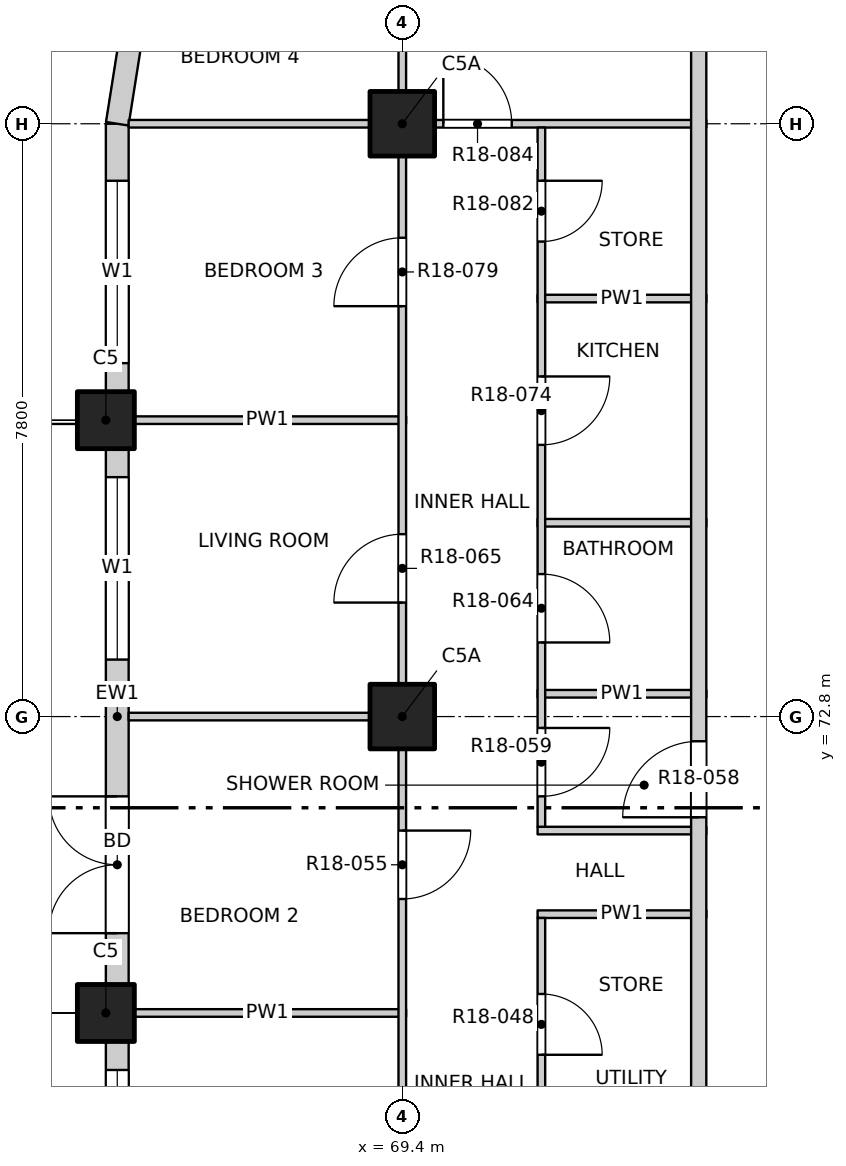
"""IFC4 building model, lengths in metres.
Left out: names, types, materials, properties, quantities, classifications, styles, units other than length and angle.
Written with IfcOpenShell. Run it as: python <this file> out.ifc"""

import sys

from ifc_helpers import new_model, si_unit, direction, frame, frame_2d, origin, origin_2d, place, context, subcontext, project, spatial, rectangle, extrude, element, fill, save


model = new_model("IFC4")
c1 = context("Model", 3, precision=1e-05, world=origin(), true_north=direction((0.0, 1.0)))
c2 = subcontext(c1, "Body", "Model", "MODEL_VIEW")
j1 = project(units=[si_unit("LENGTHUNIT", "METRE"), si_unit("PLANEANGLEUNIT", "RADIAN")], contexts=[c1])
p1 = place(None, origin())
s1 = spatial("IfcSite", under=j1, at=p1, CompositionType="ELEMENT")
p2 = place(p1, origin())
s2 = spatial("IfcBuilding", under=s1, at=p2, CompositionType="ELEMENT")
p3 = place(p2, frame((0.0, 0.0, 186.0)))
s3 = spatial("IfcBuildingStorey", under=s2, at=p3, CompositionType="ELEMENT", Elevation=186.0)
for number, where, z_axis, x_axis in (
    (1, (65.5, 68.9, -0.25), (0.0, 0.0, 1.0), (1.0, 0.0, 0.0)),
    (2, (65.5, 76.7, -0.25), (0.0, 0.0, 1.0), (1.0, 0.0, 0.0)),
):
    element("IfcColumn", number, at=place(p3, frame(where, z_axis=z_axis, x_axis=x_axis)), inside=s3, PredefinedType="COLUMN", context=c2, shape_type="SweptSolid", body=[
        extrude(rectangle(XDim=0.75, YDim=0.75, at=origin_2d()), origin(), (0.0, 0.0, 1.0), 3.4),
    ])
for number, where, z_axis, x_axis in (
    (3, (69.4, 72.8, -0.25), (0.0, 0.0, 1.0), (1.0, 0.0, 0.0)),
    (4, (69.4, 80.6, -0.25), (0.0, 0.0, 1.0), (1.0, 0.0, 0.0)),
):
    element("IfcColumn", number, at=place(p3, frame(where, z_axis=z_axis, x_axis=x_axis)), inside=s3, PredefinedType="COLUMN", context=c2, shape_type="SweptSolid", body=[
        extrude(rectangle(XDim=0.85, YDim=0.85, at=origin_2d()), origin(), (0.0, 0.0, 1.0), 3.4),
    ])
p4 = place(p3, frame((65.65, 61.475, 0.0), z_axis=(0.0, 0.0, 1.0), x_axis=(0.0, 1.0, 0.0)))
e5 = element("IfcWall", 5, at=p4, inside=s3, PredefinedType="SOLIDWALL", context=c2, shape_type="SweptSolid", body=[
    extrude(rectangle(XDim=7.05, YDim=0.3, at=frame_2d((3.525, 0.0))), origin(), (0.0, 0.0, 1.0), 2.7),
])
p5 = place(p4, frame((0.675, 0.0, 0.0)))
e6 = element("IfcOpeningElement", 6, at=p5, cuts=e5, PredefinedType="OPENING", context=c2, shape_type="SweptSolid", body=[
    extrude(rectangle(XDim=1.8, YDim=2.4, at=frame_2d((0.9, 1.2))), frame((0.0, 0.16, 0.0), z_axis=(0.0, -1.0, 0.0), x_axis=(1.0, 0.0, 0.0)), (0.0, 0.0, 1.0), 0.32),
])
p6 = place(p4, frame((4.275, 0.0, 0.9)))
e7 = element("IfcOpeningElement", 7, at=p6, cuts=e5, PredefinedType="OPENING", context=c2, shape_type="SweptSolid", body=[
    extrude(rectangle(XDim=2.4, YDim=1.8, at=frame_2d((1.2, 0.9))), frame((0.0, 0.16, 0.0), z_axis=(0.0, -1.0, 0.0), x_axis=(1.0, 0.0, 0.0)), (0.0, 0.0, 1.0), 0.32),
])
p7 = place(p3, frame((65.65, 69.275, 0.0), z_axis=(0.0, 0.0, 1.0), x_axis=(0.0, 1.0, 0.0)))
e8 = element("IfcWall", 8, at=p7, inside=s3, PredefinedType="SOLIDWALL", context=c2, shape_type="SweptSolid", body=[
    extrude(rectangle(XDim=7.05, YDim=0.3, at=frame_2d((3.525, 0.0))), origin(), (0.0, 0.0, 1.0), 2.7),
])
p8 = place(p7, frame((0.675, 0.0, 0.0)))
e9 = element("IfcOpeningElement", 9, at=p8, cuts=e8, PredefinedType="OPENING", context=c2, shape_type="SweptSolid", body=[
    extrude(rectangle(XDim=1.8, YDim=2.4, at=frame_2d((0.9, 1.2))), frame((0.0, 0.16, 0.0), z_axis=(0.0, -1.0, 0.0), x_axis=(1.0, 0.0, 0.0)), (0.0, 0.0, 1.0), 0.32),
])
p9 = place(p7, frame((4.275, 0.0, 0.9)))
e10 = element("IfcOpeningElement", 10, at=p9, cuts=e8, PredefinedType="OPENING", context=c2, shape_type="SweptSolid", body=[
    extrude(rectangle(XDim=2.4, YDim=1.8, at=frame_2d((1.2, 0.9))), frame((0.0, 0.16, 0.0), z_axis=(0.0, -1.0, 0.0), x_axis=(1.0, 0.0, 0.0)), (0.0, 0.0, 1.0), 0.32),
])
p10 = place(p3, frame((65.65, 77.075, 0.0), z_axis=(0.0, 0.0, 1.0), x_axis=(0.0, 1.0, 0.0)))
e11 = element("IfcWall", 11, at=p10, inside=s3, PredefinedType="SOLIDWALL", context=c2, shape_type="SweptSolid", body=[
    extrude(rectangle(XDim=3.525, YDim=0.3, at=frame_2d((1.763, 0.0))), origin(), (0.0, 0.0, 1.0), 2.7),
])
p11 = place(p10, frame((0.375, 0.0, 0.9)))
e12 = element("IfcOpeningElement", 12, at=p11, cuts=e11, PredefinedType="OPENING", context=c2, shape_type="SweptSolid", body=[
    extrude(rectangle(XDim=2.4, YDim=1.8, at=frame_2d((1.2, 0.9))), frame((0.0, 0.16, 0.0), z_axis=(0.0, -1.0, 0.0), x_axis=(1.0, 0.0, 0.0)), (0.0, 0.0, 1.0), 0.32),
])
p12 = place(p3, frame((65.833, 81.759, 0.0), z_axis=(0.0, 0.0, 1.0), x_axis=(-0.156496880861, -0.987678452879, 0.0)))
e13 = element("IfcWall", 13, at=p12, inside=s3, PredefinedType="SOLIDWALL", context=c2, shape_type="SweptSolid", body=[
    extrude(rectangle(XDim=1.173, YDim=0.3, at=frame_2d((0.586, 0.0))), origin(), (0.0, 0.0, 1.0), 2.7),
])
p13 = place(p3, frame((65.8, 68.9, 0.0), z_axis=(0.0, 0.0, 1.0), x_axis=(1.0, 0.0, 0.0)))
e14 = element("IfcWall", 14, at=p13, inside=s3, PredefinedType="PARTITIONING", context=c2, shape_type="SweptSolid", body=[
    extrude(rectangle(XDim=3.65, YDim=0.1, at=frame_2d((1.825, 0.0))), origin(), (0.0, 0.0, 1.0), 2.55),
])
for number, where, z_axis, x_axis in (
    (15, (71.18, 70.2, 0.0), (0.0, 0.0, 1.0), (1.0, 0.0, 0.0)),
    (16, (71.18, 71.3, 0.0), (0.0, 0.0, 1.0), (1.0, 0.0, 0.0)),
):
    element("IfcWall", number, at=place(p3, frame(where, z_axis=z_axis, x_axis=x_axis)), inside=s3, PredefinedType="PARTITIONING", context=c2, shape_type="SweptSolid", body=[
        extrude(rectangle(XDim=2.22, YDim=0.1, at=frame_2d((1.11, 0.0))), origin(), (0.0, 0.0, 1.0), 3.15),
    ])
p14 = place(p3, frame((65.8, 72.8, 0.0), z_axis=(0.0, 0.0, 1.0), x_axis=(1.0, 0.0, 0.0)))
e17 = element("IfcWall", 17, at=p14, inside=s3, PredefinedType="PARTITIONING", context=c2, shape_type="SweptSolid", body=[
    extrude(rectangle(XDim=3.65, YDim=0.1, at=frame_2d((1.825, 0.0))), origin(), (0.0, 0.0, 1.0), 3.15),
])
for number, where, z_axis, x_axis in (
    (18, (71.18, 73.1, 0.0), (0.0, 0.0, 1.0), (1.0, 0.0, 0.0)),
    (19, (71.18, 75.35, 0.0), (0.0, 0.0, 1.0), (1.0, 0.0, 0.0)),
):
    element("IfcWall", number, at=place(p3, frame(where, z_axis=z_axis, x_axis=x_axis)), inside=s3, PredefinedType="PARTITIONING", context=c2, shape_type="SweptSolid", body=[
        extrude(rectangle(XDim=2.22, YDim=0.1, at=frame_2d((1.11, 0.0))), origin(), (0.0, 0.0, 1.0), 3.15),
    ])
p15 = place(p3, frame((65.8, 76.7, 0.0), z_axis=(0.0, 0.0, 1.0), x_axis=(1.0, 0.0, 0.0)))
e20 = element("IfcWall", 20, at=p15, inside=s3, PredefinedType="PARTITIONING", context=c2, shape_type="SweptSolid", body=[
    extrude(rectangle(XDim=3.65, YDim=0.1, at=frame_2d((1.825, 0.0))), origin(), (0.0, 0.0, 1.0), 2.55),
])
p16 = place(p3, frame((71.18, 78.3, 0.0), z_axis=(0.0, 0.0, 1.0), x_axis=(1.0, 0.0, 0.0)))
e21 = element("IfcWall", 21, at=p16, inside=s3, PredefinedType="PARTITIONING", context=c2, shape_type="SweptSolid", body=[
    extrude(rectangle(XDim=2.22, YDim=0.1, at=frame_2d((1.11, 0.0))), origin(), (0.0, 0.0, 1.0), 3.15),
])
p17 = place(p3, frame((65.8, 80.6, 0.0), z_axis=(0.0, 0.0, 1.0), x_axis=(1.0, 0.0, 0.0)))
e22 = element("IfcWall", 22, at=p17, inside=s3, PredefinedType="PARTITIONING", context=c2, shape_type="SweptSolid", body=[
    extrude(rectangle(XDim=7.6, YDim=0.1, at=frame_2d((3.8, 0.0))), origin(), (0.0, 0.0, 1.0), 3.15),
])
p18 = place(p17, frame((4.14, 0.0, 0.0)))
e23 = element("IfcOpeningElement", 23, at=p18, cuts=e22, PredefinedType="OPENING", context=c2, shape_type="SweptSolid", body=[
    extrude(rectangle(XDim=0.9, YDim=2.1, at=frame_2d((0.45, 1.05))), frame((0.0, 0.06, 0.0), z_axis=(0.0, -1.0, 0.0), x_axis=(1.0, 0.0, 0.0)), (0.0, 0.0, 1.0), 0.12),
])
p19 = place(p3, frame((69.4, 45.8, 0.0), z_axis=(0.0, 0.0, 1.0), x_axis=(0.0, 1.0, 0.0)))
e24 = element("IfcWall", 24, at=p19, inside=s3, PredefinedType="PARTITIONING", context=c2, shape_type="SweptSolid", body=[
    extrude(rectangle(XDim=38.4, YDim=0.1, at=frame_2d((19.2, 0.0))), origin(), (0.0, 0.0, 1.0), 3.15),
])
p20 = place(p19, frame((1.05, 0.0, 0.0)))
e25 = element("IfcOpeningElement", 25, at=p20, cuts=e24, PredefinedType="OPENING", context=c2, shape_type="SweptSolid", body=[
    extrude(rectangle(XDim=1.2, YDim=2.1, at=frame_2d((0.6, 1.05))), frame((0.0, 0.06, 0.0), z_axis=(0.0, -1.0, 0.0), x_axis=(1.0, 0.0, 0.0)), (0.0, 0.0, 1.0), 0.12),
])
p21 = place(p19, frame((5.1, 0.0, 0.0)))
e26 = element("IfcOpeningElement", 26, at=p21, cuts=e24, PredefinedType="OPENING", context=c2, shape_type="SweptSolid", body=[
    extrude(rectangle(XDim=0.9, YDim=2.1, at=frame_2d((0.45, 1.05))), frame((0.0, 0.06, 0.0), z_axis=(0.0, -1.0, 0.0), x_axis=(1.0, 0.0, 0.0)), (0.0, 0.0, 1.0), 0.12),
])
p22 = place(p19, frame((9.0, 0.0, 0.0)))
e27 = element("IfcOpeningElement", 27, at=p22, cuts=e24, PredefinedType="OPENING", context=c2, shape_type="SweptSolid", body=[
    extrude(rectangle(XDim=0.9, YDim=2.1, at=frame_2d((0.45, 1.05))), frame((0.0, 0.06, 0.0), z_axis=(0.0, -1.0, 0.0), x_axis=(1.0, 0.0, 0.0)), (0.0, 0.0, 1.0), 0.12),
])
p23 = place(p19, frame((12.9, 0.0, 0.0)))
e28 = element("IfcOpeningElement", 28, at=p23, cuts=e24, PredefinedType="OPENING", context=c2, shape_type="SweptSolid", body=[
    extrude(rectangle(XDim=0.9, YDim=2.1, at=frame_2d((0.45, 1.05))), frame((0.0, 0.06, 0.0), z_axis=(0.0, -1.0, 0.0), x_axis=(1.0, 0.0, 0.0)), (0.0, 0.0, 1.0), 0.12),
])
p24 = place(p19, frame((16.8, 0.0, 0.0)))
e29 = element("IfcOpeningElement", 29, at=p24, cuts=e24, PredefinedType="OPENING", context=c2, shape_type="SweptSolid", body=[
    extrude(rectangle(XDim=0.9, YDim=2.1, at=frame_2d((0.45, 1.05))), frame((0.0, 0.06, 0.0), z_axis=(0.0, -1.0, 0.0), x_axis=(1.0, 0.0, 0.0)), (0.0, 0.0, 1.0), 0.12),
])
p25 = place(p19, frame((20.7, 0.0, 0.0)))
e30 = element("IfcOpeningElement", 30, at=p25, cuts=e24, PredefinedType="OPENING", context=c2, shape_type="SweptSolid", body=[
    extrude(rectangle(XDim=0.9, YDim=2.1, at=frame_2d((0.45, 1.05))), frame((0.0, 0.06, 0.0), z_axis=(0.0, -1.0, 0.0), x_axis=(1.0, 0.0, 0.0)), (0.0, 0.0, 1.0), 0.12),
])
p26 = place(p19, frame((24.6, 0.0, 0.0)))
e31 = element("IfcOpeningElement", 31, at=p26, cuts=e24, PredefinedType="OPENING", context=c2, shape_type="SweptSolid", body=[
    extrude(rectangle(XDim=0.9, YDim=2.1, at=frame_2d((0.45, 1.05))), frame((0.0, 0.06, 0.0), z_axis=(0.0, -1.0, 0.0), x_axis=(1.0, 0.0, 0.0)), (0.0, 0.0, 1.0), 0.12),
])
p27 = place(p19, frame((28.5, 0.0, 0.0)))
e32 = element("IfcOpeningElement", 32, at=p27, cuts=e24, PredefinedType="OPENING", context=c2, shape_type="SweptSolid", body=[
    extrude(rectangle(XDim=0.9, YDim=2.1, at=frame_2d((0.45, 1.05))), frame((0.0, 0.06, 0.0), z_axis=(0.0, -1.0, 0.0), x_axis=(1.0, 0.0, 0.0)), (0.0, 0.0, 1.0), 0.12),
])
p28 = place(p19, frame((32.4, 0.0, 0.0)))
e33 = element("IfcOpeningElement", 33, at=p28, cuts=e24, PredefinedType="OPENING", context=c2, shape_type="SweptSolid", body=[
    extrude(rectangle(XDim=0.9, YDim=2.1, at=frame_2d((0.45, 1.05))), frame((0.0, 0.06, 0.0), z_axis=(0.0, -1.0, 0.0), x_axis=(1.0, 0.0, 0.0)), (0.0, 0.0, 1.0), 0.12),
])
p29 = place(p19, frame((36.15, 0.0, 0.0)))
e34 = element("IfcOpeningElement", 34, at=p29, cuts=e24, PredefinedType="OPENING", context=c2, shape_type="SweptSolid", body=[
    extrude(rectangle(XDim=1.2, YDim=2.1, at=frame_2d((0.6, 1.05))), frame((0.0, 0.06, 0.0), z_axis=(0.0, -1.0, 0.0), x_axis=(1.0, 0.0, 0.0)), (0.0, 0.0, 1.0), 0.12),
])
p30 = place(p3, frame((71.23, 63.2, 0.0), z_axis=(0.0, 0.0, 1.0), x_axis=(0.0, 1.0, 0.0)))
e35 = element("IfcWall", 35, at=p30, inside=s3, PredefinedType="PARTITIONING", context=c2, shape_type="SweptSolid", body=[
    extrude(rectangle(XDim=6.95, YDim=0.1, at=frame_2d((3.475, 0.0))), origin(), (0.0, 0.0, 1.0), 3.15),
])
p31 = place(p30, frame((0.475, 0.0, 0.0)))
e36 = element("IfcOpeningElement", 36, at=p31, cuts=e35, PredefinedType="OPENING", context=c2, shape_type="SweptSolid", body=[
    extrude(rectangle(XDim=0.8, YDim=2.1, at=frame_2d((0.4, 1.05))), frame((0.0, 0.06, 0.0), z_axis=(0.0, -1.0, 0.0), x_axis=(1.0, 0.0, 0.0)), (0.0, 0.0, 1.0), 0.12),
])
p32 = place(p30, frame((2.55, 0.0, 0.0)))
e37 = element("IfcOpeningElement", 37, at=p32, cuts=e35, PredefinedType="OPENING", context=c2, shape_type="SweptSolid", body=[
    extrude(rectangle(XDim=0.8, YDim=2.1, at=frame_2d((0.4, 1.05))), frame((0.0, 0.06, 0.0), z_axis=(0.0, -1.0, 0.0), x_axis=(1.0, 0.0, 0.0)), (0.0, 0.0, 1.0), 0.12),
])
p33 = place(p30, frame((5.15, 0.0, 0.0)))
e38 = element("IfcOpeningElement", 38, at=p33, cuts=e35, PredefinedType="OPENING", context=c2, shape_type="SweptSolid", body=[
    extrude(rectangle(XDim=0.8, YDim=2.1, at=frame_2d((0.4, 1.05))), frame((0.0, 0.06, 0.0), z_axis=(0.0, -1.0, 0.0), x_axis=(1.0, 0.0, 0.0)), (0.0, 0.0, 1.0), 0.12),
])
p34 = place(p3, frame((71.23, 71.35, 0.0), z_axis=(0.0, 0.0, 1.0), x_axis=(0.0, 1.0, 0.0)))
e39 = element("IfcWall", 39, at=p34, inside=s3, PredefinedType="PARTITIONING", context=c2, shape_type="SweptSolid", body=[
    extrude(rectangle(XDim=9.2, YDim=0.1, at=frame_2d((4.6, 0.0))), origin(), (0.0, 0.0, 1.0), 3.15),
])
p35 = place(p34, frame((0.4, 0.0, 0.0)))
e40 = element("IfcOpeningElement", 40, at=p35, cuts=e39, PredefinedType="OPENING", context=c2, shape_type="SweptSolid", body=[
    extrude(rectangle(XDim=0.9, YDim=2.1, at=frame_2d((0.45, 1.05))), frame((0.0, 0.06, 0.0), z_axis=(0.0, -1.0, 0.0), x_axis=(1.0, 0.0, 0.0)), (0.0, 0.0, 1.0), 0.12),
])
p36 = place(p34, frame((2.425, 0.0, 0.0)))
e41 = element("IfcOpeningElement", 41, at=p36, cuts=e39, PredefinedType="OPENING", context=c2, shape_type="SweptSolid", body=[
    extrude(rectangle(XDim=0.9, YDim=2.1, at=frame_2d((0.45, 1.05))), frame((0.0, 0.06, 0.0), z_axis=(0.0, -1.0, 0.0), x_axis=(1.0, 0.0, 0.0)), (0.0, 0.0, 1.0), 0.12),
])
p37 = place(p34, frame((5.025, 0.0, 0.0)))
e42 = element("IfcOpeningElement", 42, at=p37, cuts=e39, PredefinedType="OPENING", context=c2, shape_type="SweptSolid", body=[
    extrude(rectangle(XDim=0.9, YDim=2.1, at=frame_2d((0.45, 1.05))), frame((0.0, 0.06, 0.0), z_axis=(0.0, -1.0, 0.0), x_axis=(1.0, 0.0, 0.0)), (0.0, 0.0, 1.0), 0.12),
])
p38 = place(p34, frame((7.7, 0.0, 0.0)))
e43 = element("IfcOpeningElement", 43, at=p38, cuts=e39, PredefinedType="OPENING", context=c2, shape_type="SweptSolid", body=[
    extrude(rectangle(XDim=0.8, YDim=2.1, at=frame_2d((0.4, 1.05))), frame((0.0, 0.06, 0.0), z_axis=(0.0, -1.0, 0.0), x_axis=(1.0, 0.0, 0.0)), (0.0, 0.0, 1.0), 0.12),
])
p39 = place(p3, frame((73.3, 49.5, 0.0), z_axis=(0.0, 0.0, 1.0), x_axis=(0.0, 1.0, 0.0)))
e44 = element("IfcWall", 44, at=p39, inside=s3, PredefinedType="PARTITIONING", context=c2, shape_type="SweptSolid", body=[
    extrude(rectangle(XDim=34.7, YDim=0.2, at=frame_2d((17.35, 0.0))), origin(), (0.0, 0.0, 1.0), 3.15),
])
p40 = place(p39, frame((13.825, 0.0, 0.0)))
e45 = element("IfcOpeningElement", 45, at=p40, cuts=e44, PredefinedType="OPENING", context=c2, shape_type="SweptSolid", body=[
    extrude(rectangle(XDim=1.0, YDim=2.1, at=frame_2d((0.5, 1.05))), frame((0.0, 0.11, 0.0), z_axis=(0.0, -1.0, 0.0), x_axis=(1.0, 0.0, 0.0)), (0.0, 0.0, 1.0), 0.22),
])
p41 = place(p39, frame((21.975, 0.0, 0.0)))
e46 = element("IfcOpeningElement", 46, at=p41, cuts=e44, PredefinedType="OPENING", context=c2, shape_type="SweptSolid", body=[
    extrude(rectangle(XDim=1.0, YDim=2.1, at=frame_2d((0.5, 1.05))), frame((0.0, 0.11, 0.0), z_axis=(0.0, -1.0, 0.0), x_axis=(1.0, 0.0, 0.0)), (0.0, 0.0, 1.0), 0.22),
])
p42 = place(p6, origin())
e47 = element("IfcWindow", 47, at=p42, inside=s3, PartitioningType="DOUBLE_PANEL_VERTICAL", PredefinedType="WINDOW", context=c2, shape_type="SweptSolid", body=[
    extrude(rectangle(XDim=2.4, YDim=1.8, at=frame_2d((1.2, 0.9))), frame((0.0, 0.03, 0.0), z_axis=(0.0, -1.0, 0.0), x_axis=(1.0, 0.0, 0.0)), (0.0, 0.0, 1.0), 0.06),
])
fill(e7, e47)
p43 = place(p8, origin())
e48 = element("IfcDoor", 48, at=p43, inside=s3, OperationType="DOUBLE_DOOR_SINGLE_SWING", PredefinedType="DOOR", context=c2, shape_type="SweptSolid", body=[
    extrude(rectangle(XDim=1.8, YDim=2.4, at=frame_2d((0.9, 1.2))), frame((0.0, 0.025, 0.0), z_axis=(0.0, -1.0, 0.0), x_axis=(1.0, 0.0, 0.0)), (0.0, 0.0, 1.0), 0.05),
])
fill(e9, e48)
p44 = place(p9, origin())
e49 = element("IfcWindow", 49, at=p44, inside=s3, PartitioningType="DOUBLE_PANEL_VERTICAL", PredefinedType="WINDOW", context=c2, shape_type="SweptSolid", body=[
    extrude(rectangle(XDim=2.4, YDim=1.8, at=frame_2d((1.2, 0.9))), frame((0.0, 0.03, 0.0), z_axis=(0.0, -1.0, 0.0), x_axis=(1.0, 0.0, 0.0)), (0.0, 0.0, 1.0), 0.06),
])
fill(e10, e49)
p45 = place(p11, origin())
e50 = element("IfcWindow", 50, at=p45, inside=s3, PartitioningType="DOUBLE_PANEL_VERTICAL", PredefinedType="WINDOW", context=c2, shape_type="SweptSolid", body=[
    extrude(rectangle(XDim=2.4, YDim=1.8, at=frame_2d((1.2, 0.9))), frame((0.0, 0.03, 0.0), z_axis=(0.0, -1.0, 0.0), x_axis=(1.0, 0.0, 0.0)), (0.0, 0.0, 1.0), 0.06),
])
fill(e12, e50)
p46 = place(p33, origin())
e51 = element("IfcDoor", 51, at=p46, inside=s3, OperationType="SINGLE_SWING_RIGHT", PredefinedType="DOOR", context=c2, shape_type="SweptSolid", body=[
    extrude(rectangle(XDim=0.8, YDim=2.1, at=frame_2d((0.4, 1.05))), frame((0.0, 0.025, 0.0), z_axis=(0.0, -1.0, 0.0), x_axis=(1.0, 0.0, 0.0)), (0.0, 0.0, 1.0), 0.05),
])
fill(e38, e51)
p47 = place(p26, origin())
e52 = element("IfcDoor", 52, at=p47, inside=s3, OperationType="SINGLE_SWING_LEFT", PredefinedType="DOOR", context=c2, shape_type="SweptSolid", body=[
    extrude(rectangle(XDim=0.9, YDim=2.1, at=frame_2d((0.45, 1.05))), frame((0.0, 0.025, 0.0), z_axis=(0.0, -1.0, 0.0), x_axis=(1.0, 0.0, 0.0)), (0.0, 0.0, 1.0), 0.05),
])
fill(e31, e52)
p48 = place(p41, origin())
e53 = element("IfcDoor", 53, at=p48, inside=s3, OperationType="SINGLE_SWING_RIGHT", PredefinedType="DOOR", context=c2, shape_type="SweptSolid", body=[
    extrude(rectangle(XDim=1.0, YDim=2.1, at=frame_2d((0.5, 1.05))), frame((0.0, 0.025, 0.0), z_axis=(0.0, -1.0, 0.0), x_axis=(1.0, 0.0, 0.0)), (0.0, 0.0, 1.0), 0.05),
])
fill(e46, e53)
p49 = place(p35, origin())
e54 = element("IfcDoor", 54, at=p49, inside=s3, OperationType="SINGLE_SWING_LEFT", PredefinedType="DOOR", context=c2, shape_type="SweptSolid", body=[
    extrude(rectangle(XDim=0.9, YDim=2.1, at=frame_2d((0.45, 1.05))), frame((0.0, 0.025, 0.0), z_axis=(0.0, -1.0, 0.0), x_axis=(1.0, 0.0, 0.0)), (0.0, 0.0, 1.0), 0.05),
])
fill(e40, e54)
p50 = place(p36, origin())
e55 = element("IfcDoor", 55, at=p50, inside=s3, OperationType="SINGLE_SWING_RIGHT", PredefinedType="DOOR", context=c2, shape_type="SweptSolid", body=[
    extrude(rectangle(XDim=0.9, YDim=2.1, at=frame_2d((0.45, 1.05))), frame((0.0, 0.025, 0.0), z_axis=(0.0, -1.0, 0.0), x_axis=(1.0, 0.0, 0.0)), (0.0, 0.0, 1.0), 0.05),
])
fill(e41, e55)
p51 = place(p27, origin())
e56 = element("IfcDoor", 56, at=p51, inside=s3, OperationType="SINGLE_SWING_LEFT", PredefinedType="DOOR", context=c2, shape_type="SweptSolid", body=[
    extrude(rectangle(XDim=0.9, YDim=2.1, at=frame_2d((0.45, 1.05))), frame((0.0, 0.025, 0.0), z_axis=(0.0, -1.0, 0.0), x_axis=(1.0, 0.0, 0.0)), (0.0, 0.0, 1.0), 0.05),
])
fill(e32, e56)
p52 = place(p37, origin())
e57 = element("IfcDoor", 57, at=p52, inside=s3, OperationType="SINGLE_SWING_LEFT", PredefinedType="DOOR", context=c2, shape_type="SweptSolid", body=[
    extrude(rectangle(XDim=0.9, YDim=2.1, at=frame_2d((0.45, 1.05))), frame((0.0, 0.025, 0.0), z_axis=(0.0, -1.0, 0.0), x_axis=(1.0, 0.0, 0.0)), (0.0, 0.0, 1.0), 0.05),
])
fill(e42, e57)
p53 = place(p28, origin())
e58 = element("IfcDoor", 58, at=p53, inside=s3, OperationType="SINGLE_SWING_LEFT", PredefinedType="DOOR", context=c2, shape_type="SweptSolid", body=[
    extrude(rectangle(XDim=0.9, YDim=2.1, at=frame_2d((0.45, 1.05))), frame((0.0, 0.025, 0.0), z_axis=(0.0, -1.0, 0.0), x_axis=(1.0, 0.0, 0.0)), (0.0, 0.0, 1.0), 0.05),
])
fill(e33, e58)
p54 = place(p38, origin())
e59 = element("IfcDoor", 59, at=p54, inside=s3, OperationType="SINGLE_SWING_LEFT", PredefinedType="DOOR", context=c2, shape_type="SweptSolid", body=[
    extrude(rectangle(XDim=0.8, YDim=2.1, at=frame_2d((0.4, 1.05))), frame((0.0, 0.025, 0.0), z_axis=(0.0, -1.0, 0.0), x_axis=(1.0, 0.0, 0.0)), (0.0, 0.0, 1.0), 0.05),
])
fill(e43, e59)
p55 = place(p18, origin())
e60 = element("IfcDoor", 60, at=p55, inside=s3, OperationType="SINGLE_SWING_LEFT", PredefinedType="DOOR", context=c2, shape_type="SweptSolid", body=[
    extrude(rectangle(XDim=0.9, YDim=2.1, at=frame_2d((0.45, 1.05))), frame((0.0, 0.025, 0.0), z_axis=(0.0, -1.0, 0.0), x_axis=(1.0, 0.0, 0.0)), (0.0, 0.0, 1.0), 0.05),
])
fill(e23, e60)
save(model, sys.argv[1])
